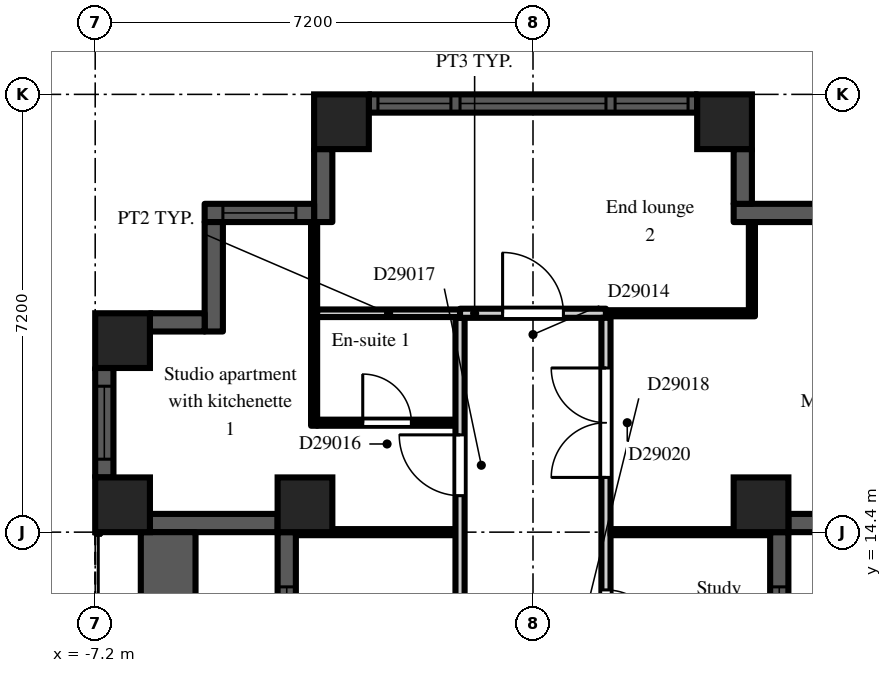
"""IFC4 building model, lengths in metres.
Left out: names, types, materials, properties, quantities, classifications, styles, units other than length and angle.
Written with IfcOpenShell. Run it as: python <this file> out.ifc"""

import sys

from ifc_helpers import new_model, si_unit, direction, frame, frame_2d, origin, origin_2d, place, context, subcontext, project, spatial, rectangle, extrude, element, fill, save


model = new_model("IFC4")
c1 = context("Model", 3, precision=1e-05, world=origin(), true_north=direction((0.0, 1.0)))
c2 = subcontext(c1, "Body", "Model", "MODEL_VIEW")
j1 = project(units=[si_unit("LENGTHUNIT", "METRE"), si_unit("PLANEANGLEUNIT", "RADIAN")], contexts=[c1])
p1 = place(None, origin())
s1 = spatial("IfcSite", under=j1, at=p1, CompositionType="ELEMENT")
p2 = place(p1, origin())
s2 = spatial("IfcBuilding", under=s1, at=p2, CompositionType="ELEMENT")
p3 = place(p2, frame((0.0, 0.0, 201.9)))
s3 = spatial("IfcBuildingStorey", under=s2, at=p3, CompositionType="ELEMENT", Elevation=201.9)
for number, where, z_axis, x_axis in (
    (1, (-6.75, 14.85, 0.0), (0.0, 0.0, 1.0), (1.0, 0.0, 0.0)),
    (2, (-6.75, 17.55, 0.0), (0.0, 0.0, 1.0), (1.0, 0.0, 0.0)),
    (3, (-3.75, 14.85, 0.0), (0.0, 0.0, 1.0), (1.0, 0.0, 0.0)),
    (4, (-3.15, 21.15, 0.0), (0.0, 0.0, 1.0), (1.0, 0.0, 0.0)),
    (5, (3.15, 21.15, 0.0), (0.0, 0.0, 1.0), (1.0, 0.0, 0.0)),
    (6, (3.75, 14.85, 0.0), (0.0, 0.0, 1.0), (1.0, 0.0, 0.0)),
):
    element("IfcColumn", number, at=place(p3, frame(where, z_axis=z_axis, x_axis=x_axis)), inside=s3, PredefinedType="COLUMN", context=c2, shape_type="SweptSolid", body=[
        extrude(rectangle(XDim=0.9, YDim=0.9, at=origin_2d()), origin(), (0.0, 0.0, 1.0), 3.0),
    ])
p4 = place(p3, frame((4.05, 7.2, 0.0), z_axis=(0.0, 0.0, 1.0), x_axis=(0.0, 1.0, 0.0)))
e7 = element("IfcWall", 7, at=p4, inside=s3, PredefinedType="SOLIDWALL", context=c2, shape_type="SweptSolid", body=[
    extrude(rectangle(XDim=7.2, YDim=0.3, at=frame_2d((3.6, 0.0))), origin(), (0.0, 0.0, 1.0), 2.3),
])
p5 = place(p4, frame((3.0, 0.0, 0.0)))
e8 = element("IfcOpeningElement", 8, at=p5, cuts=e7, PredefinedType="OPENING", context=c2, shape_type="SweptSolid", body=[
    extrude(rectangle(XDim=1.2, YDim=2.05, at=frame_2d((0.6, 1.025))), frame((0.0, 0.16, 0.0), z_axis=(0.0, -1.0, 0.0), x_axis=(1.0, 0.0, 0.0)), (0.0, 0.0, 1.0), 0.32),
])
p6 = place(p4, frame((0.9, 0.0, 0.2)))
e9 = element("IfcOpeningElement", 9, at=p6, cuts=e7, PredefinedType="OPENING", context=c2, shape_type="SweptSolid", body=[
    extrude(rectangle(XDim=1.8, YDim=1.85, at=frame_2d((0.9, 0.925))), frame((0.0, 0.16, 0.0), z_axis=(0.0, -1.0, 0.0), x_axis=(1.0, 0.0, 0.0)), (0.0, 0.0, 1.0), 0.32),
])
p7 = place(p4, frame((4.5, 0.0, 0.2)))
e10 = element("IfcOpeningElement", 10, at=p7, cuts=e7, PredefinedType="OPENING", context=c2, shape_type="SweptSolid", body=[
    extrude(rectangle(XDim=1.8, YDim=1.85, at=frame_2d((0.9, 0.925))), frame((0.0, 0.16, 0.0), z_axis=(0.0, -1.0, 0.0), x_axis=(1.0, 0.0, 0.0)), (0.0, 0.0, 1.0), 0.32),
])
p8 = place(p3, frame((4.2, 14.55, 0.0), z_axis=(0.0, 0.0, 1.0), x_axis=(1.0, 0.0, 0.0)))
e11 = element("IfcWall", 11, at=p8, inside=s3, PredefinedType="SOLIDWALL", context=c2, shape_type="SweptSolid", body=[
    extrude(rectangle(XDim=2.1, YDim=0.3, at=frame_2d((1.05, 0.0))), origin(), (0.0, 0.0, 1.0), 2.3),
])
p9 = place(p3, frame((5.1, 19.65, 0.0), z_axis=(0.0, 0.0, 1.0), x_axis=(-1.0, 0.0, 0.0)))
e12 = element("IfcWall", 12, at=p9, inside=s3, PredefinedType="SOLIDWALL", context=c2, shape_type="SweptSolid", body=[
    extrude(rectangle(XDim=1.8, YDim=0.3, at=frame_2d((0.9, 0.0))), origin(), (0.0, 0.0, 1.0), 2.6),
])
p10 = place(p3, frame((3.45, 19.8, 0.0), z_axis=(0.0, 0.0, 1.0), x_axis=(0.0, 1.0, 0.0)))
e13 = element("IfcWall", 13, at=p10, inside=s3, PredefinedType="SOLIDWALL", context=c2, shape_type="SweptSolid", body=[
    extrude(rectangle(XDim=0.9, YDim=0.3, at=frame_2d((0.45, 0.0))), origin(), (0.0, 0.0, 1.0), 2.6),
])
p11 = place(p3, frame((2.7, 21.45, 0.0), z_axis=(0.0, 0.0, 1.0), x_axis=(-1.0, 0.0, 0.0)))
e14 = element("IfcWall", 14, at=p11, inside=s3, PredefinedType="SOLIDWALL", context=c2, shape_type="SweptSolid", body=[
    extrude(rectangle(XDim=5.4, YDim=0.3, at=frame_2d((2.7, 0.0))), origin(), (0.0, 0.0, 1.0), 2.3),
])
p12 = place(p11, frame((1.5, 0.0, 0.2)))
e15 = element("IfcOpeningElement", 15, at=p12, cuts=e14, PredefinedType="OPENING", context=c2, shape_type="SweptSolid", body=[
    extrude(rectangle(XDim=2.4, YDim=1.85, at=frame_2d((1.2, 0.925))), frame((0.0, 0.16, 0.0), z_axis=(0.0, -1.0, 0.0), x_axis=(1.0, 0.0, 0.0)), (0.0, 0.0, 1.0), 0.32),
])
p13 = place(p11, frame((0.15, 0.0, 0.2)))
e16 = element("IfcOpeningElement", 16, at=p13, cuts=e14, PredefinedType="OPENING", context=c2, shape_type="SweptSolid", body=[
    extrude(rectangle(XDim=1.2, YDim=1.85, at=frame_2d((0.6, 0.925))), frame((0.0, 0.16, 0.0), z_axis=(0.0, -1.0, 0.0), x_axis=(1.0, 0.0, 0.0)), (0.0, 0.0, 1.0), 0.32),
])
p14 = place(p11, frame((4.05, 0.0, 0.2)))
e17 = element("IfcOpeningElement", 17, at=p14, cuts=e14, PredefinedType="OPENING", context=c2, shape_type="SweptSolid", body=[
    extrude(rectangle(XDim=1.2, YDim=1.85, at=frame_2d((0.6, 0.925))), frame((0.0, 0.16, 0.0), z_axis=(0.0, -1.0, 0.0), x_axis=(1.0, 0.0, 0.0)), (0.0, 0.0, 1.0), 0.32),
])
p15 = place(p3, frame((-3.45, 20.7, 0.0), z_axis=(0.0, 0.0, 1.0), x_axis=(0.0, -1.0, 0.0)))
e18 = element("IfcWall", 18, at=p15, inside=s3, PredefinedType="SOLIDWALL", context=c2, shape_type="SweptSolid", body=[
    extrude(rectangle(XDim=1.2, YDim=0.3, at=frame_2d((0.6, 0.0))), origin(), (0.0, 0.0, 1.0), 2.6),
])
p16 = place(p3, frame((-3.6, 19.65, 0.0), z_axis=(0.0, 0.0, 1.0), x_axis=(-1.0, 0.0, 0.0)))
e19 = element("IfcWall", 19, at=p16, inside=s3, PredefinedType="SOLIDWALL", context=c2, shape_type="SweptSolid", body=[
    extrude(rectangle(XDim=1.8, YDim=0.3, at=frame_2d((0.9, 0.0))), origin(), (0.0, 0.0, 1.0), 2.6),
])
p17 = place(p16, frame((0.3, 0.0, 0.2)))
e20 = element("IfcOpeningElement", 20, at=p17, cuts=e19, PredefinedType="OPENING", context=c2, shape_type="SweptSolid", body=[
    extrude(rectangle(XDim=1.2, YDim=1.85, at=frame_2d((0.6, 0.925))), frame((0.0, 0.16, 0.0), z_axis=(0.0, -1.0, 0.0), x_axis=(1.0, 0.0, 0.0)), (0.0, 0.0, 1.0), 0.32),
])
p18 = place(p3, frame((-5.25, 19.5, 0.0), z_axis=(0.0, 0.0, 1.0), x_axis=(0.0, -1.0, 0.0)))
e21 = element("IfcWall", 21, at=p18, inside=s3, PredefinedType="SOLIDWALL", context=c2, shape_type="SweptSolid", body=[
    extrude(rectangle(XDim=1.8, YDim=0.3, at=frame_2d((0.9, 0.0))), origin(), (0.0, 0.0, 1.0), 2.6),
])
p19 = place(p3, frame((-5.4, 17.85, 0.0), z_axis=(0.0, 0.0, 1.0), x_axis=(-1.0, 0.0, 0.0)))
e22 = element("IfcWall", 22, at=p19, inside=s3, PredefinedType="SOLIDWALL", context=c2, shape_type="SweptSolid", body=[
    extrude(rectangle(XDim=0.9, YDim=0.3, at=frame_2d((0.45, 0.0))), origin(), (0.0, 0.0, 1.0), 2.6),
])
p20 = place(p3, frame((-7.05, 17.1, 0.0), z_axis=(0.0, 0.0, 1.0), x_axis=(0.0, -1.0, 0.0)))
e23 = element("IfcWall", 23, at=p20, inside=s3, PredefinedType="SOLIDWALL", context=c2, shape_type="SweptSolid", body=[
    extrude(rectangle(XDim=1.8, YDim=0.3, at=frame_2d((0.9, 0.0))), origin(), (0.0, 0.0, 1.0), 2.3),
])
p21 = place(p20, frame((0.3, 0.0, 0.2)))
e24 = element("IfcOpeningElement", 24, at=p21, cuts=e23, PredefinedType="OPENING", context=c2, shape_type="SweptSolid", body=[
    extrude(rectangle(XDim=1.2, YDim=1.85, at=frame_2d((0.6, 0.925))), frame((0.0, 0.16, 0.0), z_axis=(0.0, -1.0, 0.0), x_axis=(1.0, 0.0, 0.0)), (0.0, 0.0, 1.0), 0.32),
])
p22 = place(p3, frame((-6.3, 14.55, 0.0), z_axis=(0.0, 0.0, 1.0), x_axis=(1.0, 0.0, 0.0)))
e25 = element("IfcWall", 25, at=p22, inside=s3, PredefinedType="SOLIDWALL", context=c2, shape_type="SweptSolid", body=[
    extrude(rectangle(XDim=2.1, YDim=0.3, at=frame_2d((1.05, 0.0))), origin(), (0.0, 0.0, 1.0), 2.3),
])
p23 = place(p3, frame((-4.05, 14.4, 0.0), z_axis=(0.0, 0.0, 1.0), x_axis=(0.0, -1.0, 0.0)))
e26 = element("IfcWall", 26, at=p23, inside=s3, PredefinedType="SOLIDWALL", context=c2, shape_type="SweptSolid", body=[
    extrude(rectangle(XDim=7.2, YDim=0.3, at=frame_2d((3.6, 0.0))), origin(), (0.0, 0.0, 1.0), 2.3),
])
p24 = place(p23, frame((3.0, 0.0, 0.0)))
e27 = element("IfcOpeningElement", 27, at=p24, cuts=e26, PredefinedType="OPENING", context=c2, shape_type="SweptSolid", body=[
    extrude(rectangle(XDim=1.2, YDim=2.05, at=frame_2d((0.6, 1.025))), frame((0.0, 0.16, 0.0), z_axis=(0.0, -1.0, 0.0), x_axis=(1.0, 0.0, 0.0)), (0.0, 0.0, 1.0), 0.32),
])
p25 = place(p23, frame((0.9, 0.0, 0.2)))
e28 = element("IfcOpeningElement", 28, at=p25, cuts=e26, PredefinedType="OPENING", context=c2, shape_type="SweptSolid", body=[
    extrude(rectangle(XDim=1.8, YDim=1.85, at=frame_2d((0.9, 0.925))), frame((0.0, 0.16, 0.0), z_axis=(0.0, -1.0, 0.0), x_axis=(1.0, 0.0, 0.0)), (0.0, 0.0, 1.0), 0.32),
])
p26 = place(p23, frame((4.5, 0.0, 0.2)))
e29 = element("IfcOpeningElement", 29, at=p26, cuts=e26, PredefinedType="OPENING", context=c2, shape_type="SweptSolid", body=[
    extrude(rectangle(XDim=1.8, YDim=1.85, at=frame_2d((0.9, 0.925))), frame((0.0, 0.16, 0.0), z_axis=(0.0, -1.0, 0.0), x_axis=(1.0, 0.0, 0.0)), (0.0, 0.0, 1.0), 0.32),
])
p27 = place(p3, frame((-6.0, 7.2, 0.0), z_axis=(0.0, 0.0, 1.0), x_axis=(0.0, 1.0, 0.0)))
e30 = element("IfcWall", 30, at=p27, inside=s3, PredefinedType="PARAPET", context=c2, shape_type="SweptSolid", body=[
    extrude(rectangle(XDim=7.2, YDim=0.9, at=frame_2d((3.6, 0.0))), origin(), (0.0, 0.0, 1.0), 0.8),
])
p28 = place(p3, frame((-3.9, 14.4, 0.0), z_axis=(0.0, 0.0, 1.0), x_axis=(1.0, 0.0, 0.0)))
e31 = element("IfcWall", 31, at=p28, inside=s3, PredefinedType="PARTITIONING", context=c2, shape_type="SweptSolid", body=[
    extrude(rectangle(XDim=2.625, YDim=0.1, at=frame_2d((1.312, 0.0))), origin(), (0.0, 0.0, 1.0), 2.6),
])
p29 = place(p3, frame((-3.6, 16.15, 0.0), z_axis=(0.0, 0.0, 1.0), x_axis=(0.0, 1.0, 0.0)))
e32 = element("IfcWall", 32, at=p29, inside=s3, PredefinedType="PARTITIONING", context=c2, shape_type="SweptSolid", body=[
    extrude(rectangle(XDim=3.35, YDim=0.1, at=frame_2d((1.675, 0.0))), origin(), (0.0, 0.0, 1.0), 2.6),
])
p30 = place(p3, frame((-3.55, 16.2, 0.0), z_axis=(0.0, 0.0, 1.0), x_axis=(1.0, 0.0, 0.0)))
e33 = element("IfcWall", 33, at=p30, inside=s3, PredefinedType="PARTITIONING", context=c2, shape_type="SweptSolid", body=[
    extrude(rectangle(XDim=2.275, YDim=0.1, at=frame_2d((1.138, 0.0))), origin(), (0.0, 0.0, 1.0), 2.6),
])
p31 = place(p30, frame((0.75, 0.0, 0.0)))
e34 = element("IfcOpeningElement", 34, at=p31, cuts=e33, PredefinedType="OPENING", context=c2, shape_type="SweptSolid", body=[
    extrude(rectangle(XDim=0.8, YDim=2.1, at=frame_2d((0.4, 1.05))), frame((0.0, 0.06, 0.0), z_axis=(0.0, -1.0, 0.0), x_axis=(1.0, 0.0, 0.0)), (0.0, 0.0, 1.0), 0.12),
])
p32 = place(p3, frame((-3.55, 18.0, 0.0), z_axis=(0.0, 0.0, 1.0), x_axis=(1.0, 0.0, 0.0)))
e35 = element("IfcWall", 35, at=p32, inside=s3, PredefinedType="PARTITIONING", context=c2, shape_type="SweptSolid", body=[
    extrude(rectangle(XDim=2.35, YDim=0.125, at=frame_2d((1.175, 0.0))), origin(), (0.0, 0.0, 1.0), 2.6),
])
p33 = place(p3, frame((-1.2, 1.275, 0.0), z_axis=(0.0, 0.0, 1.0), x_axis=(0.0, 1.0, 0.0)))
e36 = element("IfcWall", 36, at=p33, inside=s3, PredefinedType="PARTITIONING", context=c2, shape_type="SweptSolid", body=[
    extrude(rectangle(XDim=16.65, YDim=0.15, at=frame_2d((8.325, 0.0))), origin(), (0.0, 0.0, 1.0), 2.6),
])
p34 = place(p33, frame((2.475, 0.0, 0.0)))
e37 = element("IfcOpeningElement", 37, at=p34, cuts=e36, PredefinedType="OPENING", context=c2, shape_type="SweptSolid", body=[
    extrude(rectangle(XDim=0.9, YDim=2.1, at=frame_2d((0.45, 1.05))), frame((0.0, 0.085, 0.0), z_axis=(0.0, -1.0, 0.0), x_axis=(1.0, 0.0, 0.0)), (0.0, 0.0, 1.0), 0.17),
])
p35 = place(p33, frame((10.875, 0.0, 0.0)))
e38 = element("IfcOpeningElement", 38, at=p35, cuts=e36, PredefinedType="OPENING", context=c2, shape_type="SweptSolid", body=[
    extrude(rectangle(XDim=0.9, YDim=2.1, at=frame_2d((0.45, 1.05))), frame((0.0, 0.085, 0.0), z_axis=(0.0, -1.0, 0.0), x_axis=(1.0, 0.0, 0.0)), (0.0, 0.0, 1.0), 0.17),
])
p36 = place(p33, frame((13.725, 0.0, 0.0)))
e39 = element("IfcOpeningElement", 39, at=p36, cuts=e36, PredefinedType="OPENING", context=c2, shape_type="SweptSolid", body=[
    extrude(rectangle(XDim=1.0, YDim=2.1, at=frame_2d((0.5, 1.05))), frame((0.0, 0.085, 0.0), z_axis=(0.0, -1.0, 0.0), x_axis=(1.0, 0.0, 0.0)), (0.0, 0.0, 1.0), 0.17),
])
p37 = place(p3, frame((-1.2, 18.0, 0.0), z_axis=(0.0, 0.0, 1.0), x_axis=(1.0, 0.0, 0.0)))
e40 = element("IfcWall", 40, at=p37, inside=s3, PredefinedType="PARTITIONING", context=c2, shape_type="SweptSolid", body=[
    extrude(rectangle(XDim=2.4, YDim=0.15, at=frame_2d((1.2, 0.0))), origin(), (0.0, 0.0, 1.0), 2.6),
])
p38 = place(p37, frame((0.7, 0.0, 0.0)))
e41 = element("IfcOpeningElement", 41, at=p38, cuts=e40, PredefinedType="OPENING", context=c2, shape_type="SweptSolid", body=[
    extrude(rectangle(XDim=1.0, YDim=2.1, at=frame_2d((0.5, 1.05))), frame((0.0, 0.085, 0.0), z_axis=(0.0, -1.0, 0.0), x_axis=(1.0, 0.0, 0.0)), (0.0, 0.0, 1.0), 0.17),
])
p39 = place(p3, frame((1.2, 1.125, 0.0), z_axis=(0.0, 0.0, 1.0), x_axis=(0.0, 1.0, 0.0)))
e42 = element("IfcWall", 42, at=p39, inside=s3, PredefinedType="PARTITIONING", context=c2, shape_type="SweptSolid", body=[
    extrude(rectangle(XDim=16.8, YDim=0.15, at=frame_2d((8.4, 0.0))), origin(), (0.0, 0.0, 1.0), 2.6),
])
p40 = place(p39, frame((2.625, 0.0, 0.0)))
e43 = element("IfcOpeningElement", 43, at=p40, cuts=e42, PredefinedType="OPENING", context=c2, shape_type="SweptSolid", body=[
    extrude(rectangle(XDim=0.9, YDim=2.1, at=frame_2d((0.45, 1.05))), frame((0.0, 0.085, 0.0), z_axis=(0.0, -1.0, 0.0), x_axis=(1.0, 0.0, 0.0)), (0.0, 0.0, 1.0), 0.17),
])
p41 = place(p39, frame((11.425, 0.0, 0.0)))
e44 = element("IfcOpeningElement", 44, at=p41, cuts=e42, PredefinedType="OPENING", context=c2, shape_type="SweptSolid", body=[
    extrude(rectangle(XDim=0.9, YDim=2.1, at=frame_2d((0.45, 1.05))), frame((0.0, 0.085, 0.0), z_axis=(0.0, -1.0, 0.0), x_axis=(1.0, 0.0, 0.0)), (0.0, 0.0, 1.0), 0.17),
])
p42 = place(p39, frame((7.825, 0.0, 0.0)))
e45 = element("IfcOpeningElement", 45, at=p42, cuts=e42, PredefinedType="OPENING", context=c2, shape_type="SweptSolid", body=[
    extrude(rectangle(XDim=0.9, YDim=2.1, at=frame_2d((0.45, 1.05))), frame((0.0, 0.085, 0.0), z_axis=(0.0, -1.0, 0.0), x_axis=(1.0, 0.0, 0.0)), (0.0, 0.0, 1.0), 0.17),
])
p43 = place(p39, frame((14.175, 0.0, 0.0)))
e46 = element("IfcOpeningElement", 46, at=p43, cuts=e42, PredefinedType="OPENING", context=c2, shape_type="SweptSolid", body=[
    extrude(rectangle(XDim=1.8, YDim=2.1, at=frame_2d((0.9, 1.05))), frame((0.0, 0.085, 0.0), z_axis=(0.0, -1.0, 0.0), x_axis=(1.0, 0.0, 0.0)), (0.0, 0.0, 1.0), 0.17),
])
p44 = place(p3, frame((1.275, 14.4, 0.0), z_axis=(0.0, 0.0, 1.0), x_axis=(1.0, 0.0, 0.0)))
e47 = element("IfcWall", 47, at=p44, inside=s3, PredefinedType="PARTITIONING", context=c2, shape_type="SweptSolid", body=[
    extrude(rectangle(XDim=2.625, YDim=0.1, at=frame_2d((1.312, 0.0))), origin(), (0.0, 0.0, 1.0), 2.6),
])
p45 = place(p3, frame((1.2, 18.0, 0.0), z_axis=(0.0, 0.0, 1.0), x_axis=(1.0, 0.0, 0.0)))
e48 = element("IfcWall", 48, at=p45, inside=s3, PredefinedType="PARTITIONING", context=c2, shape_type="SweptSolid", body=[
    extrude(rectangle(XDim=2.45, YDim=0.1, at=frame_2d((1.225, 0.0))), origin(), (0.0, 0.0, 1.0), 2.6),
])
p46 = place(p3, frame((3.6, 18.05, 0.0), z_axis=(0.0, 0.0, 1.0), x_axis=(0.0, 1.0, 0.0)))
e49 = element("IfcWall", 49, at=p46, inside=s3, PredefinedType="PARTITIONING", context=c2, shape_type="SweptSolid", body=[
    extrude(rectangle(XDim=1.45, YDim=0.1, at=frame_2d((0.725, 0.0))), origin(), (0.0, 0.0, 1.0), 2.6),
])
p47 = place(p7, origin())
e50 = element("IfcWindow", 50, at=p47, inside=s3, PartitioningType="SINGLE_PANEL", PredefinedType="WINDOW", context=c2, shape_type="SweptSolid", body=[
    extrude(rectangle(XDim=1.8, YDim=1.85, at=frame_2d((0.9, 0.925))), frame((0.0, 0.03, 0.0), z_axis=(0.0, -1.0, 0.0), x_axis=(1.0, 0.0, 0.0)), (0.0, 0.0, 1.0), 0.06),
])
fill(e10, e50)
p48 = place(p12, origin())
e51 = element("IfcWindow", 51, at=p48, inside=s3, PartitioningType="SINGLE_PANEL", PredefinedType="WINDOW", context=c2, shape_type="SweptSolid", body=[
    extrude(rectangle(XDim=2.4, YDim=1.85, at=frame_2d((1.2, 0.925))), frame((0.0, 0.03, 0.0), z_axis=(0.0, -1.0, 0.0), x_axis=(1.0, 0.0, 0.0)), (0.0, 0.0, 1.0), 0.06),
])
fill(e15, e51)
p49 = place(p13, origin())
e52 = element("IfcWindow", 52, at=p49, inside=s3, PartitioningType="SINGLE_PANEL", PredefinedType="WINDOW", context=c2, shape_type="SweptSolid", body=[
    extrude(rectangle(XDim=1.2, YDim=1.85, at=frame_2d((0.6, 0.925))), frame((0.0, 0.03, 0.0), z_axis=(0.0, -1.0, 0.0), x_axis=(1.0, 0.0, 0.0)), (0.0, 0.0, 1.0), 0.06),
])
fill(e16, e52)
p50 = place(p14, origin())
e53 = element("IfcWindow", 53, at=p50, inside=s3, PartitioningType="SINGLE_PANEL", PredefinedType="WINDOW", context=c2, shape_type="SweptSolid", body=[
    extrude(rectangle(XDim=1.2, YDim=1.85, at=frame_2d((0.6, 0.925))), frame((0.0, 0.03, 0.0), z_axis=(0.0, -1.0, 0.0), x_axis=(1.0, 0.0, 0.0)), (0.0, 0.0, 1.0), 0.06),
])
fill(e17, e53)
p51 = place(p17, origin())
e54 = element("IfcWindow", 54, at=p51, inside=s3, PartitioningType="SINGLE_PANEL", PredefinedType="WINDOW", context=c2, shape_type="SweptSolid", body=[
    extrude(rectangle(XDim=1.2, YDim=1.85, at=frame_2d((0.6, 0.925))), frame((0.0, 0.03, 0.0), z_axis=(0.0, -1.0, 0.0), x_axis=(1.0, 0.0, 0.0)), (0.0, 0.0, 1.0), 0.06),
])
fill(e20, e54)
p52 = place(p21, origin())
e55 = element("IfcWindow", 55, at=p52, inside=s3, PartitioningType="SINGLE_PANEL", PredefinedType="WINDOW", context=c2, shape_type="SweptSolid", body=[
    extrude(rectangle(XDim=1.2, YDim=1.85, at=frame_2d((0.6, 0.925))), frame((0.0, 0.03, 0.0), z_axis=(0.0, -1.0, 0.0), x_axis=(1.0, 0.0, 0.0)), (0.0, 0.0, 1.0), 0.06),
])
fill(e24, e55)
p53 = place(p25, origin())
e56 = element("IfcWindow", 56, at=p53, inside=s3, PartitioningType="SINGLE_PANEL", PredefinedType="WINDOW", context=c2, shape_type="SweptSolid", body=[
    extrude(rectangle(XDim=1.8, YDim=1.85, at=frame_2d((0.9, 0.925))), frame((0.0, 0.03, 0.0), z_axis=(0.0, -1.0, 0.0), x_axis=(1.0, 0.0, 0.0)), (0.0, 0.0, 1.0), 0.06),
])
fill(e28, e56)
p54 = place(p38, origin())
e57 = element("IfcDoor", 57, at=p54, inside=s3, OperationType="SINGLE_SWING_LEFT", PredefinedType="DOOR", context=c2, shape_type="SweptSolid", body=[
    extrude(rectangle(XDim=1.0, YDim=2.1, at=frame_2d((0.5, 1.05))), frame((0.0, 0.025, 0.0), z_axis=(0.0, -1.0, 0.0), x_axis=(1.0, 0.0, 0.0)), (0.0, 0.0, 1.0), 0.05),
])
fill(e41, e57)
p55 = place(p31, origin())
e58 = element("IfcDoor", 58, at=p55, inside=s3, OperationType="SINGLE_SWING_LEFT", PredefinedType="DOOR", context=c2, shape_type="SweptSolid", body=[
    extrude(rectangle(XDim=0.8, YDim=2.1, at=frame_2d((0.4, 1.05))), frame((0.0, 0.025, 0.0), z_axis=(0.0, -1.0, 0.0), x_axis=(1.0, 0.0, 0.0)), (0.0, 0.0, 1.0), 0.05),
])
fill(e34, e58)
p56 = place(p36, origin())
e59 = element("IfcDoor", 59, at=p56, inside=s3, OperationType="SINGLE_SWING_RIGHT", PredefinedType="DOOR", context=c2, shape_type="SweptSolid", body=[
    extrude(rectangle(XDim=1.0, YDim=2.1, at=frame_2d((0.5, 1.05))), frame((0.0, 0.025, 0.0), z_axis=(0.0, -1.0, 0.0), x_axis=(1.0, 0.0, 0.0)), (0.0, 0.0, 1.0), 0.05),
])
fill(e39, e59)
p57 = place(p41, frame((0.9, 0.0, 0.0), z_axis=(0.0, 0.0, 1.0), x_axis=(-1.0, 0.0, 0.0)))
e60 = element("IfcDoor", 60, at=p57, inside=s3, OperationType="SINGLE_SWING_RIGHT", PredefinedType="DOOR", context=c2, shape_type="SweptSolid", body=[
    extrude(rectangle(XDim=0.9, YDim=2.1, at=frame_2d((0.45, 1.05))), frame((0.0, 0.025, 0.0), z_axis=(0.0, -1.0, 0.0), x_axis=(1.0, 0.0, 0.0)), (0.0, 0.0, 1.0), 0.05),
])
fill(e44, e60)
p58 = place(p43, origin())
e61 = element("IfcDoor", 61, at=p58, inside=s3, OperationType="DOUBLE_DOOR_DOUBLE_SWING", PredefinedType="DOOR", context=c2, shape_type="SweptSolid", body=[
    extrude(rectangle(XDim=1.8, YDim=2.1, at=frame_2d((0.9, 1.05))), frame((0.0, 0.025, 0.0), z_axis=(0.0, -1.0, 0.0), x_axis=(1.0, 0.0, 0.0)), (0.0, 0.0, 1.0), 0.05),
])
fill(e46, e61)
save(model, sys.argv[1])
